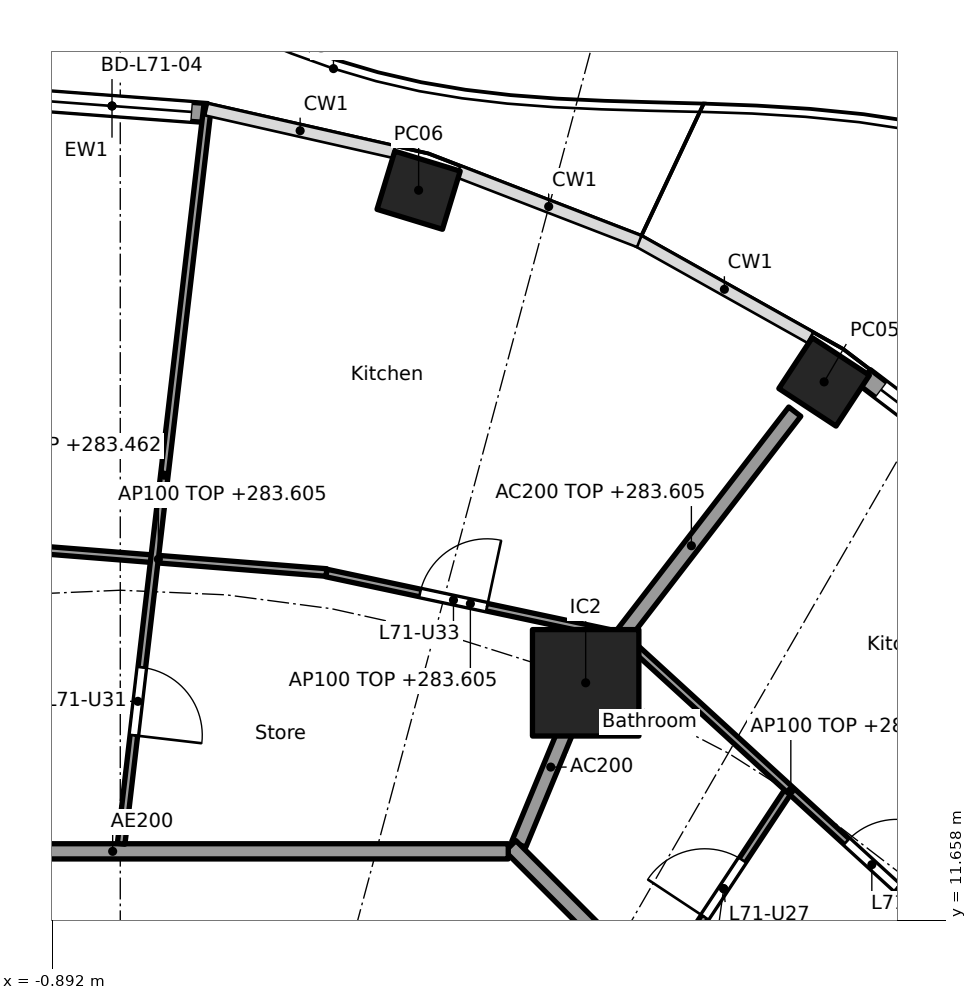
"""IFC4 building model, lengths in metres.
Left out: names, types, materials, properties, quantities, classifications, styles, units other than length and angle.
Written with IfcOpenShell. Run it as: python <this file> out.ifc"""

import sys

from ifc_helpers import new_model, si_unit, direction, frame, frame_2d, origin, origin_2d, place, context, subcontext, project, spatial, rectangle, hollow_rectangle, extrude, element, fill, save


model = new_model("IFC4")
c1 = context("Model", 3, precision=1e-05, world=origin(), true_north=direction((0.0, 1.0)))
c2 = subcontext(c1, "Body", "Model", "MODEL_VIEW")
j1 = project(units=[si_unit("LENGTHUNIT", "METRE"), si_unit("PLANEANGLEUNIT", "RADIAN")], contexts=[c1])
p1 = place(None, origin())
s1 = spatial("IfcSite", under=j1, at=p1, CompositionType="ELEMENT")
p2 = place(p1, origin())
s2 = spatial("IfcBuilding", under=s1, at=p2, CompositionType="ELEMENT")
p3 = place(p2, frame((0.0, 0.0, 280.7)))
s3 = spatial("IfcBuildingStorey", under=s2, at=p3, CompositionType="ELEMENT", Elevation=280.7)
for number, where, z_axis, x_axis in (
    (1, (9.26, 18.741, 0.0), (0.0, 0.0, 1.0), (-0.836, 0.549, 0.0)),
    (2, (3.925, 21.262, 0.0), (0.0, 0.0, 1.0), (-0.957, 0.292, 0.0)),
):
    element("IfcColumn", number, at=place(p3, frame(where, z_axis=z_axis, x_axis=x_axis)), inside=s3, PredefinedType="COLUMN", context=c2, shape_type="SweptSolid", body=[
        extrude(hollow_rectangle(XDim=0.9, YDim=0.8, WallThickness=0.028, at=origin_2d()), origin(), (0.0, 0.0, 1.0), 3.7),
    ])
p4 = place(p3, frame((6.123, 14.782, 0.0), z_axis=(0.0, 0.0, 1.0), x_axis=(1.0, 0.0, 0.0)))
e3 = element("IfcColumn", 3, at=p4, inside=s3, PredefinedType="COLUMN", context=c2, shape_type="SweptSolid", body=[
    extrude(rectangle(XDim=1.4, YDim=1.4, at=origin_2d()), origin(), (0.0, 0.0, 1.0), 3.7),
])
p5 = place(p3, frame((9.792, 18.802, 0.0), z_axis=(0.0, 0.0, 1.0), x_axis=(0.796010739377, -0.605282498339, 0.0)))
e4 = element("IfcWall", 4, at=p5, inside=s3, PredefinedType="SOLIDWALL", context=c2, shape_type="SweptSolid", body=[
    extrude(rectangle(XDim=2.641, YDim=0.25, at=frame_2d((1.32, 0.0))), origin(), (0.0, 0.0, 1.0), 3.44),
])
p6 = place(p5, frame((0.27, 0.0, 0.0)))
e5 = element("IfcOpeningElement", 5, at=p6, cuts=e4, PredefinedType="OPENING", context=c2, shape_type="SweptSolid", body=[
    extrude(rectangle(XDim=2.1, YDim=2.4, at=frame_2d((1.05, 1.2))), frame((0.0, 0.135, 0.0), z_axis=(0.0, -1.0, 0.0), x_axis=(1.0, 0.0, 0.0)), (0.0, 0.0, 1.0), 0.27),
])
p7 = place(p3, frame((-1.361, 22.464, 0.0), z_axis=(0.0, 0.0, 1.0), x_axis=(0.997229684519, -0.074383844448, 0.0)))
e6 = element("IfcWall", 6, at=p7, inside=s3, PredefinedType="SOLIDWALL", context=c2, shape_type="SweptSolid", body=[
    extrude(rectangle(XDim=2.511, YDim=0.25, at=frame_2d((1.255, 0.0))), origin(), (0.0, 0.0, 1.0), 3.44),
])
p8 = place(p7, frame((0.205, 0.0, 0.0)))
e7 = element("IfcOpeningElement", 7, at=p8, cuts=e6, PredefinedType="OPENING", context=c2, shape_type="SweptSolid", body=[
    extrude(rectangle(XDim=2.1, YDim=2.4, at=frame_2d((1.05, 1.2))), frame((0.0, 0.135, 0.0), z_axis=(0.0, -1.0, 0.0), x_axis=(1.0, 0.0, 0.0)), (0.0, 0.0, 1.0), 0.27),
])
p9 = place(p3, frame((5.243, 12.657, 0.0), z_axis=(0.0, 0.0, 1.0), x_axis=(0.382691608661, 0.923876145736, 0.0)))
e8 = element("IfcWall", 8, at=p9, inside=s3, PredefinedType="PARTITIONING", context=c2, shape_type="SweptSolid", body=[
    extrude(rectangle(XDim=2.2, YDim=0.2, at=frame_2d((1.1, 0.0))), origin(), (0.0, 0.0, 1.0), 3.44),
])
p10 = place(p3, frame((6.154, 14.822, 0.0), z_axis=(0.0, 0.0, 1.0), x_axis=(0.610687612043, 0.791871606068, 0.0)))
e9 = element("IfcWall", 9, at=p10, inside=s3, PredefinedType="PARTITIONING", context=c2, shape_type="SweptSolid", body=[
    extrude(rectangle(XDim=4.455, YDim=0.2, at=frame_2d((2.228, 0.0))), origin(), (0.0, 0.0, 1.0), 2.905),
])
p11 = place(p3, frame((12.635, 5.134, 0.0), z_axis=(0.0, 0.0, 1.0), x_axis=(-0.707106781187, 0.707106781187, 0.0)))
e10 = element("IfcWall", 10, at=p11, inside=s3, PredefinedType="PARTITIONING", context=c2, shape_type="SweptSolid", body=[
    extrude(rectangle(XDim=10.609, YDim=0.2, at=frame_2d((5.305, 0.0))), origin(), (0.0, 0.0, 1.0), 3.44),
])
p12 = place(p11, frame((4.804, 0.0, 0.0)))
e11 = element("IfcOpeningElement", 11, at=p12, cuts=e10, PredefinedType="OPENING", context=c2, shape_type="SweptSolid", body=[
    extrude(rectangle(XDim=1.0, YDim=2.1, at=frame_2d((0.5, 1.05))), frame((0.0, 0.11, 0.0), z_axis=(0.0, -1.0, 0.0), x_axis=(1.0, 0.0, 0.0)), (0.0, 0.0, 1.0), 0.22),
])
p13 = place(p3, frame((5.104, 12.565, 0.0), z_axis=(0.0, 0.0, 1.0), x_axis=(-1.0, 0.0, 0.0)))
e12 = element("IfcWall", 12, at=p13, inside=s3, PredefinedType="PARTITIONING", context=c2, shape_type="SweptSolid", body=[
    extrude(rectangle(XDim=10.409, YDim=0.2, at=frame_2d((5.205, 0.0))), origin(), (0.0, 0.0, 1.0), 3.44),
])
p14 = place(p13, frame((6.339, 0.0, 0.0)))
e13 = element("IfcOpeningElement", 13, at=p14, cuts=e12, PredefinedType="OPENING", context=c2, shape_type="SweptSolid", body=[
    extrude(rectangle(XDim=1.0, YDim=2.1, at=frame_2d((0.5, 1.05))), frame((0.0, 0.11, 0.0), z_axis=(0.0, -1.0, 0.0), x_axis=(1.0, 0.0, 0.0)), (0.0, 0.0, 1.0), 0.22),
])
p15 = place(p3, frame((10.972, 11.398, 0.0), z_axis=(0.0, 0.0, 1.0), x_axis=(-0.737830272434, 0.674986288069, 0.0)))
e14 = element("IfcWall", 14, at=p15, inside=s3, PredefinedType="PARTITIONING", context=c2, shape_type="SweptSolid", body=[
    extrude(rectangle(XDim=5.827, YDim=0.1, at=frame_2d((2.914, 0.0))), origin(), (0.0, 0.0, 1.0), 2.905),
])
p16 = place(p15, frame((1.019, 0.0, 0.0)))
e15 = element("IfcOpeningElement", 15, at=p16, cuts=e14, PredefinedType="OPENING", context=c2, shape_type="SweptSolid", body=[
    extrude(rectangle(XDim=0.9, YDim=2.1, at=frame_2d((0.45, 1.05))), frame((0.0, 0.06, 0.0), z_axis=(0.0, -1.0, 0.0), x_axis=(1.0, 0.0, 0.0)), (0.0, 0.0, 1.0), 0.12),
])
p17 = place(p3, frame((7.1, 10.808, 0.0), z_axis=(0.0, 0.0, 1.0), x_axis=(0.55204370542, 0.833815175747, 0.0)))
e16 = element("IfcWall", 16, at=p17, inside=s3, PredefinedType="PARTITIONING", context=c2, shape_type="SweptSolid", body=[
    extrude(rectangle(XDim=3.036, YDim=0.1, at=frame_2d((1.518, 0.0))), origin(), (0.0, 0.0, 1.0), 2.762),
])
p18 = place(p17, frame((1.068, 0.0, 0.0)))
e17 = element("IfcOpeningElement", 17, at=p18, cuts=e16, PredefinedType="OPENING", context=c2, shape_type="SweptSolid", body=[
    extrude(rectangle(XDim=0.9, YDim=2.1, at=frame_2d((0.45, 1.05))), frame((0.0, 0.06, 0.0), z_axis=(0.0, -1.0, 0.0), x_axis=(1.0, 0.0, 0.0)), (0.0, 0.0, 1.0), 0.12),
])
p19 = place(p3, frame((6.5, 15.419, 0.0), z_axis=(0.0, 0.0, 1.0), x_axis=(-0.978053492557, 0.208353943321, 0.0)))
e18 = element("IfcWall", 18, at=p19, inside=s3, PredefinedType="PARTITIONING", context=c2, shape_type="SweptSolid", body=[
    extrude(rectangle(XDim=3.874, YDim=0.1, at=frame_2d((1.937, 0.0))), origin(), (0.0, 0.0, 1.0), 2.905),
])
p20 = place(p19, frame((1.714, 0.0, 0.0)))
e19 = element("IfcOpeningElement", 19, at=p20, cuts=e18, PredefinedType="OPENING", context=c2, shape_type="SweptSolid", body=[
    extrude(rectangle(XDim=0.9, YDim=2.1, at=frame_2d((0.45, 1.05))), frame((0.0, 0.06, 0.0), z_axis=(0.0, -1.0, 0.0), x_axis=(1.0, 0.0, 0.0)), (0.0, 0.0, 1.0), 0.12),
])
p21 = place(p3, frame((2.713, 16.233, 0.0), z_axis=(0.0, 0.0, 1.0), x_axis=(-0.996870142942, 0.079056423588, 0.0)))
e20 = element("IfcWall", 20, at=p21, inside=s3, PredefinedType="PARTITIONING", context=c2, shape_type="SweptSolid", body=[
    extrude(rectangle(XDim=4.438, YDim=0.1, at=frame_2d((2.219, 0.0))), origin(), (0.0, 0.0, 1.0), 2.905),
])
p22 = place(p3, frame((0.012, 12.664, 0.0), z_axis=(0.0, 0.0, 1.0), x_axis=(0.11636251357, 0.993206808996, 0.0)))
e21 = element("IfcWall", 21, at=p22, inside=s3, PredefinedType="PARTITIONING", context=c2, shape_type="SweptSolid", body=[
    extrude(rectangle(XDim=9.765, YDim=0.1, at=frame_2d((4.882, 0.0))), origin(), (0.0, 0.0, 1.0), 2.762),
])
p23 = place(p22, frame((1.437, 0.0, 0.0)))
e22 = element("IfcOpeningElement", 22, at=p23, cuts=e21, PredefinedType="OPENING", context=c2, shape_type="SweptSolid", body=[
    extrude(rectangle(XDim=0.9, YDim=2.1, at=frame_2d((0.45, 1.05))), frame((0.0, 0.06, 0.0), z_axis=(0.0, -1.0, 0.0), x_axis=(1.0, 0.0, 0.0)), (0.0, 0.0, 1.0), 0.12),
])
p24 = place(p6, origin())
e23 = element("IfcDoor", 23, at=p24, inside=s3, OperationType="SLIDING_TO_LEFT", PredefinedType="DOOR", context=c2, shape_type="SweptSolid", body=[
    extrude(rectangle(XDim=2.1, YDim=2.4, at=frame_2d((1.05, 1.2))), frame((0.0, 0.025, 0.0), z_axis=(0.0, -1.0, 0.0), x_axis=(1.0, 0.0, 0.0)), (0.0, 0.0, 1.0), 0.05),
])
fill(e5, e23)
p25 = place(p8, origin())
e24 = element("IfcDoor", 24, at=p25, inside=s3, OperationType="SLIDING_TO_LEFT", PredefinedType="DOOR", context=c2, shape_type="SweptSolid", body=[
    extrude(rectangle(XDim=2.1, YDim=2.4, at=frame_2d((1.05, 1.2))), frame((0.0, 0.025, 0.0), z_axis=(0.0, -1.0, 0.0), x_axis=(1.0, 0.0, 0.0)), (0.0, 0.0, 1.0), 0.05),
])
fill(e7, e24)
p26 = place(p18, origin())
e25 = element("IfcDoor", 25, at=p26, inside=s3, OperationType="SINGLE_SWING_LEFT", PredefinedType="DOOR", context=c2, shape_type="SweptSolid", body=[
    extrude(rectangle(XDim=0.9, YDim=2.1, at=frame_2d((0.45, 1.05))), frame((0.0, 0.025, 0.0), z_axis=(0.0, -1.0, 0.0), x_axis=(1.0, 0.0, 0.0)), (0.0, 0.0, 1.0), 0.05),
])
fill(e17, e25)
p27 = place(p16, frame((0.9, 0.0, 0.0), x_axis=(-1.0, 0.0, 0.0)))
e26 = element("IfcDoor", 26, at=p27, inside=s3, OperationType="SINGLE_SWING_RIGHT", PredefinedType="DOOR", context=c2, shape_type="SweptSolid", body=[
    extrude(rectangle(XDim=0.9, YDim=2.1, at=frame_2d((0.45, 1.05))), frame((0.0, 0.025, 0.0), z_axis=(0.0, -1.0, 0.0), x_axis=(1.0, 0.0, 0.0)), (0.0, 0.0, 1.0), 0.05),
])
fill(e15, e26)
p28 = place(p23, frame((0.9, 0.0, 0.0), x_axis=(-1.0, 0.0, 0.0)))
e27 = element("IfcDoor", 27, at=p28, inside=s3, OperationType="SINGLE_SWING_RIGHT", PredefinedType="DOOR", context=c2, shape_type="SweptSolid", body=[
    extrude(rectangle(XDim=0.9, YDim=2.1, at=frame_2d((0.45, 1.05))), frame((0.0, 0.025, 0.0), z_axis=(0.0, -1.0, 0.0), x_axis=(1.0, 0.0, 0.0)), (0.0, 0.0, 1.0), 0.05),
])
fill(e22, e27)
p29 = place(p20, frame((0.9, 0.0, 0.0), x_axis=(-1.0, 0.0, 0.0)))
e28 = element("IfcDoor", 28, at=p29, inside=s3, OperationType="SINGLE_SWING_RIGHT", PredefinedType="DOOR", context=c2, shape_type="SweptSolid", body=[
    extrude(rectangle(XDim=0.9, YDim=2.1, at=frame_2d((0.45, 1.05))), frame((0.0, 0.025, 0.0), z_axis=(0.0, -1.0, 0.0), x_axis=(1.0, 0.0, 0.0)), (0.0, 0.0, 1.0), 0.05),
])
fill(e19, e28)
save(model, sys.argv[1])
